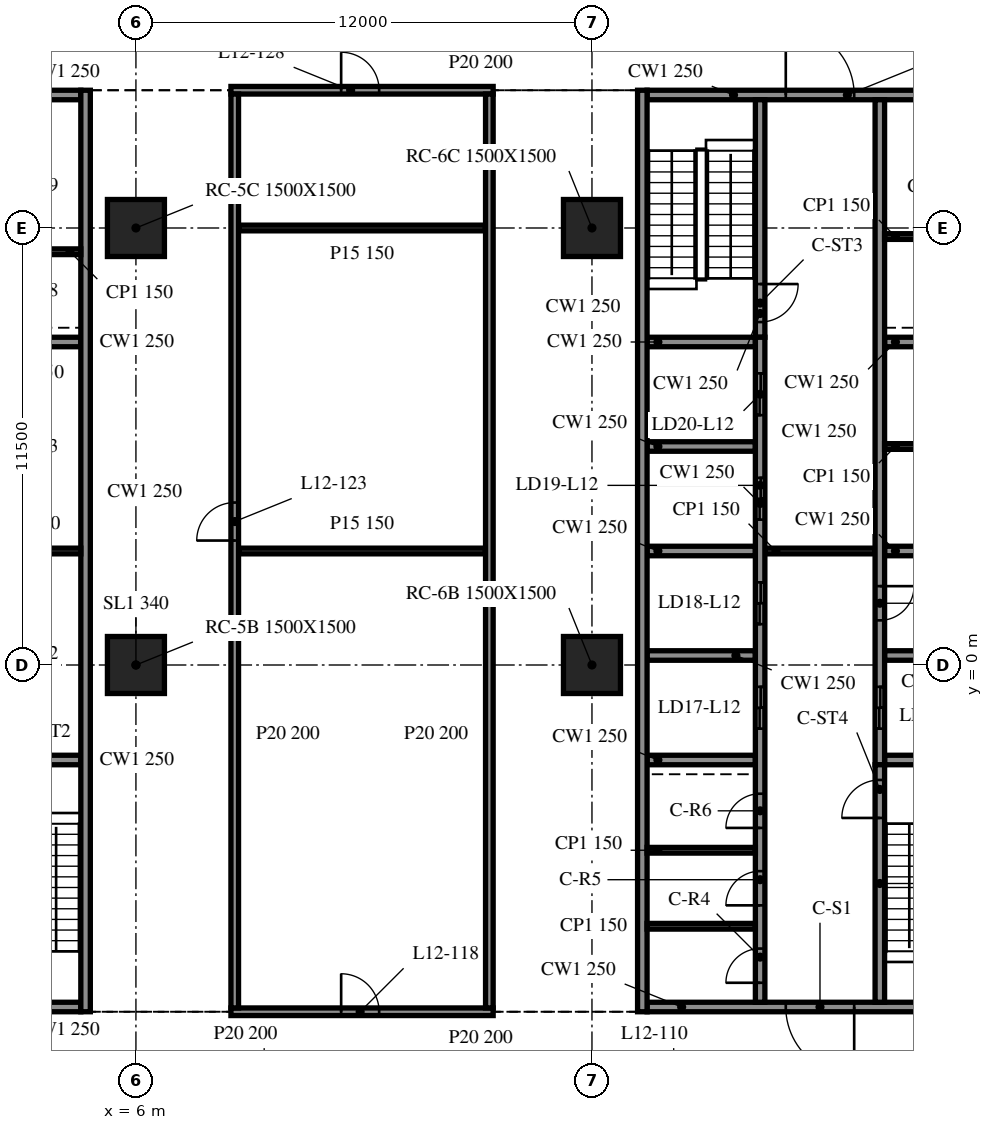
"""IFC4 building model, lengths in metres.
Left out: names, types, materials, properties, quantities, classifications, styles, units other than length and angle.
Written with IfcOpenShell. Run it as: python <this file> out.ifc"""

import sys

from ifc_helpers import new_model, si_unit, direction, frame, frame_2d, origin, origin_2d, place, context, subcontext, project, spatial, rectangle, extrude, element, fill, save


model = new_model("IFC4")
c1 = context("Model", 3, precision=1e-05, world=origin(), true_north=direction((0.0, 1.0)))
c2 = subcontext(c1, "Body", "Model", "MODEL_VIEW")
j1 = project(units=[si_unit("LENGTHUNIT", "METRE"), si_unit("PLANEANGLEUNIT", "RADIAN")], contexts=[c1])
p1 = place(None, origin())
s1 = spatial("IfcSite", under=j1, at=p1, CompositionType="ELEMENT")
p2 = place(p1, origin())
s2 = spatial("IfcBuilding", under=s1, at=p2, CompositionType="ELEMENT")
p3 = place(p2, frame((0.0, 0.0, 54.6)))
s3 = spatial("IfcBuildingStorey", under=s2, at=p3, CompositionType="ELEMENT", Elevation=54.6)
for number, where, z_axis, x_axis in (
    (1, (6.0, 0.0, -0.34), (0.0, 0.0, 1.0), (1.0, 0.0, 0.0)),
    (2, (6.0, 11.5, -0.34), (0.0, 0.0, 1.0), (1.0, 0.0, 0.0)),
    (3, (18.0, 0.0, -0.34), (0.0, 0.0, 1.0), (1.0, 0.0, 0.0)),
    (4, (18.0, 11.5, -0.34), (0.0, 0.0, 1.0), (1.0, 0.0, 0.0)),
):
    element("IfcColumn", number, at=place(p3, frame(where, z_axis=z_axis, x_axis=x_axis)), inside=s3, PredefinedType="COLUMN", context=c2, shape_type="SweptSolid", body=[
        extrude(rectangle(XDim=1.5, YDim=1.5, at=origin_2d()), origin(), (0.0, 0.0, 1.0), 4.3),
    ])
p4 = place(p3, frame((4.675, -9.125, 0.0), z_axis=(0.0, 0.0, 1.0), x_axis=(0.0, 1.0, 0.0)))
e5 = element("IfcWall", 5, at=p4, inside=s3, PredefinedType="SOLIDWALL", context=c2, shape_type="SweptSolid", body=[
    extrude(rectangle(XDim=24.25, YDim=0.25, at=frame_2d((12.125, 0.0))), origin(), (0.0, 0.0, 1.0), 3.96),
])
p5 = place(p3, frame((4.55, -9.0, 0.0), z_axis=(0.0, 0.0, 1.0), x_axis=(-1.0, 0.0, 0.0)))
e6 = element("IfcWall", 6, at=p5, inside=s3, PredefinedType="SOLIDWALL", context=c2, shape_type="SweptSolid", body=[
    extrude(rectangle(XDim=9.1, YDim=0.25, at=frame_2d((4.55, 0.0))), origin(), (0.0, 0.0, 1.0), 3.96),
])
p6 = place(p5, frame((3.65, 0.0, 0.0)))
e7 = element("IfcOpeningElement", 7, at=p6, cuts=e6, PredefinedType="OPENING", context=c2, shape_type="SweptSolid", body=[
    extrude(rectangle(XDim=1.8, YDim=2.1, at=frame_2d((0.9, 1.05))), frame((0.0, 0.135, 0.0), z_axis=(0.0, -1.0, 0.0), x_axis=(1.0, 0.0, 0.0)), (0.0, 0.0, 1.0), 0.27),
])
p7 = place(p3, frame((-4.55, 15.0, 0.0), z_axis=(0.0, 0.0, 1.0), x_axis=(1.0, 0.0, 0.0)))
e8 = element("IfcWall", 8, at=p7, inside=s3, PredefinedType="SOLIDWALL", context=c2, shape_type="SweptSolid", body=[
    extrude(rectangle(XDim=9.1, YDim=0.25, at=frame_2d((4.55, 0.0))), origin(), (0.0, 0.0, 1.0), 3.96),
])
p8 = place(p7, frame((3.65, 0.0, 0.0)))
e9 = element("IfcOpeningElement", 9, at=p8, cuts=e8, PredefinedType="OPENING", context=c2, shape_type="SweptSolid", body=[
    extrude(rectangle(XDim=1.8, YDim=2.1, at=frame_2d((0.9, 1.05))), frame((0.0, 0.135, 0.0), z_axis=(0.0, -1.0, 0.0), x_axis=(1.0, 0.0, 0.0)), (0.0, 0.0, 1.0), 0.27),
])
for number, where, z_axis, x_axis in (
    (10, (1.7, -2.5, 0.0), (0.0, 0.0, 1.0), (1.0, 0.0, 0.0)),
    (11, (1.7, 8.5, 0.0), (0.0, 0.0, 1.0), (1.0, 0.0, 0.0)),
):
    element("IfcWall", number, at=place(p3, frame(where, z_axis=z_axis, x_axis=x_axis)), inside=s3, PredefinedType="SOLIDWALL", context=c2, shape_type="SweptSolid", body=[
        extrude(rectangle(XDim=2.85, YDim=0.25, at=frame_2d((1.425, 0.0))), origin(), (0.0, 0.0, 1.0), 3.96),
    ])
for number, where, z_axis, x_axis in (
    (12, (1.7, 3.0, 0.0), (0.0, 0.0, 1.0), (1.0, 0.0, 0.0)),
    (13, (1.7, 10.875, 0.0), (0.0, 0.0, 1.0), (1.0, 0.0, 0.0)),
):
    element("IfcWall", number, at=place(p3, frame(where, z_axis=z_axis, x_axis=x_axis)), inside=s3, PredefinedType="PARTITIONING", context=c2, shape_type="SweptSolid", body=[
        extrude(rectangle(XDim=2.85, YDim=0.15, at=frame_2d((1.425, 0.0))), origin(), (0.0, 0.0, 1.0), 3.96),
    ])
p9 = place(p3, frame((19.325, 15.125, 0.0), z_axis=(0.0, 0.0, 1.0), x_axis=(0.0, -1.0, 0.0)))
e14 = element("IfcWall", 14, at=p9, inside=s3, PredefinedType="SOLIDWALL", context=c2, shape_type="SweptSolid", body=[
    extrude(rectangle(XDim=24.25, YDim=0.25, at=frame_2d((12.125, 0.0))), origin(), (0.0, 0.0, 1.0), 3.96),
])
p10 = place(p3, frame((28.55, -9.0, 0.0), z_axis=(0.0, 0.0, 1.0), x_axis=(-1.0, 0.0, 0.0)))
e15 = element("IfcWall", 15, at=p10, inside=s3, PredefinedType="SOLIDWALL", context=c2, shape_type="SweptSolid", body=[
    extrude(rectangle(XDim=9.1, YDim=0.25, at=frame_2d((4.55, 0.0))), origin(), (0.0, 0.0, 1.0), 3.96),
])
p11 = place(p10, frame((3.65, 0.0, 0.0)))
e16 = element("IfcOpeningElement", 16, at=p11, cuts=e15, PredefinedType="OPENING", context=c2, shape_type="SweptSolid", body=[
    extrude(rectangle(XDim=1.8, YDim=2.1, at=frame_2d((0.9, 1.05))), frame((0.0, 0.135, 0.0), z_axis=(0.0, -1.0, 0.0), x_axis=(1.0, 0.0, 0.0)), (0.0, 0.0, 1.0), 0.27),
])
p12 = place(p3, frame((19.45, 15.0, 0.0), z_axis=(0.0, 0.0, 1.0), x_axis=(1.0, 0.0, 0.0)))
e17 = element("IfcWall", 17, at=p12, inside=s3, PredefinedType="SOLIDWALL", context=c2, shape_type="SweptSolid", body=[
    extrude(rectangle(XDim=9.1, YDim=0.25, at=frame_2d((4.55, 0.0))), origin(), (0.0, 0.0, 1.0), 3.96),
])
p13 = place(p12, frame((3.65, 0.0, 0.0)))
e18 = element("IfcOpeningElement", 18, at=p13, cuts=e17, PredefinedType="OPENING", context=c2, shape_type="SweptSolid", body=[
    extrude(rectangle(XDim=1.8, YDim=2.1, at=frame_2d((0.9, 1.05))), frame((0.0, 0.135, 0.0), z_axis=(0.0, -1.0, 0.0), x_axis=(1.0, 0.0, 0.0)), (0.0, 0.0, 1.0), 0.27),
])
p14 = place(p3, frame((22.425, -8.875, 0.0), z_axis=(0.0, 0.0, 1.0), x_axis=(0.0, 1.0, 0.0)))
e19 = element("IfcWall", 19, at=p14, inside=s3, PredefinedType="SOLIDWALL", context=c2, shape_type="SweptSolid", body=[
    extrude(rectangle(XDim=17.5, YDim=0.25, at=frame_2d((8.75, 0.0))), origin(), (0.0, 0.0, 1.0), 3.96),
])
p15 = place(p14, frame((7.2, 0.0, 0.0)))
e20 = element("IfcOpeningElement", 20, at=p15, cuts=e19, PredefinedType="OPENING", context=c2, shape_type="SweptSolid", body=[
    extrude(rectangle(XDim=1.1, YDim=2.1, at=frame_2d((0.55, 1.05))), frame((0.0, 0.135, 0.0), z_axis=(0.0, -1.0, 0.0), x_axis=(1.0, 0.0, 0.0)), (0.0, 0.0, 1.0), 0.27),
])
p16 = place(p14, frame((9.95, 0.0, 0.0)))
e21 = element("IfcOpeningElement", 21, at=p16, cuts=e19, PredefinedType="OPENING", context=c2, shape_type="SweptSolid", body=[
    extrude(rectangle(XDim=1.1, YDim=2.1, at=frame_2d((0.55, 1.05))), frame((0.0, 0.135, 0.0), z_axis=(0.0, -1.0, 0.0), x_axis=(1.0, 0.0, 0.0)), (0.0, 0.0, 1.0), 0.27),
])
p17 = place(p14, frame((12.7, 0.0, 0.0)))
e22 = element("IfcOpeningElement", 22, at=p17, cuts=e19, PredefinedType="OPENING", context=c2, shape_type="SweptSolid", body=[
    extrude(rectangle(XDim=1.1, YDim=2.1, at=frame_2d((0.55, 1.05))), frame((0.0, 0.135, 0.0), z_axis=(0.0, -1.0, 0.0), x_axis=(1.0, 0.0, 0.0)), (0.0, 0.0, 1.0), 0.27),
])
p18 = place(p14, frame((15.45, 0.0, 0.0)))
e23 = element("IfcOpeningElement", 23, at=p18, cuts=e19, PredefinedType="OPENING", context=c2, shape_type="SweptSolid", body=[
    extrude(rectangle(XDim=1.1, YDim=2.1, at=frame_2d((0.55, 1.05))), frame((0.0, 0.135, 0.0), z_axis=(0.0, -1.0, 0.0), x_axis=(1.0, 0.0, 0.0)), (0.0, 0.0, 1.0), 0.27),
])
p19 = place(p14, frame((0.512, 0.0, 0.0)))
e24 = element("IfcOpeningElement", 24, at=p19, cuts=e19, PredefinedType="OPENING", context=c2, shape_type="SweptSolid", body=[
    extrude(rectangle(XDim=0.9, YDim=2.1, at=frame_2d((0.45, 1.05))), frame((0.0, 0.135, 0.0), z_axis=(0.0, -1.0, 0.0), x_axis=(1.0, 0.0, 0.0)), (0.0, 0.0, 1.0), 0.27),
])
p20 = place(p14, frame((2.55, 0.0, 0.0)))
e25 = element("IfcOpeningElement", 25, at=p20, cuts=e19, PredefinedType="OPENING", context=c2, shape_type="SweptSolid", body=[
    extrude(rectangle(XDim=0.9, YDim=2.1, at=frame_2d((0.45, 1.05))), frame((0.0, 0.135, 0.0), z_axis=(0.0, -1.0, 0.0), x_axis=(1.0, 0.0, 0.0)), (0.0, 0.0, 1.0), 0.27),
])
p21 = place(p14, frame((4.587, 0.0, 0.0)))
e26 = element("IfcOpeningElement", 26, at=p21, cuts=e19, PredefinedType="OPENING", context=c2, shape_type="SweptSolid", body=[
    extrude(rectangle(XDim=0.9, YDim=2.1, at=frame_2d((0.45, 1.05))), frame((0.0, 0.135, 0.0), z_axis=(0.0, -1.0, 0.0), x_axis=(1.0, 0.0, 0.0)), (0.0, 0.0, 1.0), 0.27),
])
p22 = place(p3, frame((22.425, 14.875, 0.0), z_axis=(0.0, 0.0, 1.0), x_axis=(0.0, -1.0, 0.0)))
e27 = element("IfcWall", 27, at=p22, inside=s3, PredefinedType="SOLIDWALL", context=c2, shape_type="SweptSolid", body=[
    extrude(rectangle(XDim=6.25, YDim=0.25, at=frame_2d((3.125, 0.0))), origin(), (0.0, 0.0, 1.0), 3.96),
])
p23 = place(p22, frame((4.85, 0.0, 0.0)))
e28 = element("IfcOpeningElement", 28, at=p23, cuts=e27, PredefinedType="OPENING", context=c2, shape_type="SweptSolid", body=[
    extrude(rectangle(XDim=1.0, YDim=2.1, at=frame_2d((0.5, 1.05))), frame((0.0, 0.135, 0.0), z_axis=(0.0, -1.0, 0.0), x_axis=(1.0, 0.0, 0.0)), (0.0, 0.0, 1.0), 0.27),
])
p24 = place(p3, frame((25.575, -8.875, 0.0), z_axis=(0.0, 0.0, 1.0), x_axis=(0.0, 1.0, 0.0)))
e29 = element("IfcWall", 29, at=p24, inside=s3, PredefinedType="SOLIDWALL", context=c2, shape_type="SweptSolid", body=[
    extrude(rectangle(XDim=6.25, YDim=0.25, at=frame_2d((3.125, 0.0))), origin(), (0.0, 0.0, 1.0), 3.96),
])
p25 = place(p24, frame((4.85, 0.0, 0.0)))
e30 = element("IfcOpeningElement", 30, at=p25, cuts=e29, PredefinedType="OPENING", context=c2, shape_type="SweptSolid", body=[
    extrude(rectangle(XDim=1.0, YDim=2.1, at=frame_2d((0.5, 1.05))), frame((0.0, 0.135, 0.0), z_axis=(0.0, -1.0, 0.0), x_axis=(1.0, 0.0, 0.0)), (0.0, 0.0, 1.0), 0.27),
])
p26 = place(p3, frame((25.575, 14.875, 0.0), z_axis=(0.0, 0.0, 1.0), x_axis=(0.0, -1.0, 0.0)))
e31 = element("IfcWall", 31, at=p26, inside=s3, PredefinedType="SOLIDWALL", context=c2, shape_type="SweptSolid", body=[
    extrude(rectangle(XDim=17.5, YDim=0.25, at=frame_2d((8.75, 0.0))), origin(), (0.0, 0.0, 1.0), 3.96),
])
p27 = place(p26, frame((15.45, 0.0, 0.0)))
e32 = element("IfcOpeningElement", 32, at=p27, cuts=e31, PredefinedType="OPENING", context=c2, shape_type="SweptSolid", body=[
    extrude(rectangle(XDim=1.1, YDim=2.1, at=frame_2d((0.55, 1.05))), frame((0.0, 0.135, 0.0), z_axis=(0.0, -1.0, 0.0), x_axis=(1.0, 0.0, 0.0)), (0.0, 0.0, 1.0), 0.27),
])
p28 = place(p26, frame((12.8, 0.0, 0.0)))
e33 = element("IfcOpeningElement", 33, at=p28, cuts=e31, PredefinedType="OPENING", context=c2, shape_type="SweptSolid", body=[
    extrude(rectangle(XDim=0.9, YDim=2.1, at=frame_2d((0.45, 1.05))), frame((0.0, 0.135, 0.0), z_axis=(0.0, -1.0, 0.0), x_axis=(1.0, 0.0, 0.0)), (0.0, 0.0, 1.0), 0.27),
])
for number, where, z_axis, x_axis in (
    (34, (19.45, -2.5, 0.0), (0.0, 0.0, 1.0), (1.0, 0.0, 0.0)),
    (35, (19.45, 0.25, 0.0), (0.0, 0.0, 1.0), (1.0, 0.0, 0.0)),
    (36, (19.45, 3.0, 0.0), (0.0, 0.0, 1.0), (1.0, 0.0, 0.0)),
    (37, (19.45, 5.75, 0.0), (0.0, 0.0, 1.0), (1.0, 0.0, 0.0)),
    (38, (19.45, 8.5, 0.0), (0.0, 0.0, 1.0), (1.0, 0.0, 0.0)),
    (39, (25.7, -2.5, 0.0), (0.0, 0.0, 1.0), (1.0, 0.0, 0.0)),
    (40, (25.7, 0.25, 0.0), (0.0, 0.0, 1.0), (1.0, 0.0, 0.0)),
    (41, (25.7, 3.0, 0.0), (0.0, 0.0, 1.0), (1.0, 0.0, 0.0)),
    (42, (25.7, 8.5, 0.0), (0.0, 0.0, 1.0), (1.0, 0.0, 0.0)),
):
    element("IfcWall", number, at=place(p3, frame(where, z_axis=z_axis, x_axis=x_axis)), inside=s3, PredefinedType="SOLIDWALL", context=c2, shape_type="SweptSolid", body=[
        extrude(rectangle(XDim=2.85, YDim=0.25, at=frame_2d((1.425, 0.0))), origin(), (0.0, 0.0, 1.0), 3.96),
    ])
p29 = place(p3, frame((22.55, 3.0, 0.0), z_axis=(0.0, 0.0, 1.0), x_axis=(1.0, 0.0, 0.0)))
e43 = element("IfcWall", 43, at=p29, inside=s3, PredefinedType="PARTITIONING", context=c2, shape_type="SweptSolid", body=[
    extrude(rectangle(XDim=2.9, YDim=0.15, at=frame_2d((1.45, 0.0))), origin(), (0.0, 0.0, 1.0), 3.96),
])
for number, where, z_axis, x_axis in (
    (44, (25.7, 5.75, 0.0), (0.0, 0.0, 1.0), (1.0, 0.0, 0.0)),
    (45, (19.45, -6.875, 0.0), (0.0, 0.0, 1.0), (1.0, 0.0, 0.0)),
    (46, (19.45, -4.875, 0.0), (0.0, 0.0, 1.0), (1.0, 0.0, 0.0)),
    (47, (25.7, 11.275, 0.0), (0.0, 0.0, 1.0), (1.0, 0.0, 0.0)),
):
    element("IfcWall", number, at=place(p3, frame(where, z_axis=z_axis, x_axis=x_axis)), inside=s3, PredefinedType="PARTITIONING", context=c2, shape_type="SweptSolid", body=[
        extrude(rectangle(XDim=2.85, YDim=0.15, at=frame_2d((1.425, 0.0))), origin(), (0.0, 0.0, 1.0), 3.96),
    ])
p30 = place(p3, frame((8.5, -9.125, 0.0), z_axis=(0.0, 0.0, 1.0), x_axis=(1.0, 0.0, 0.0)))
e48 = element("IfcWall", 48, at=p30, inside=s3, PredefinedType="PARTITIONING", context=c2, shape_type="SweptSolid", body=[
    extrude(rectangle(XDim=6.9, YDim=0.2, at=frame_2d((3.45, 0.0))), origin(), (0.0, 0.0, 1.0), 3.96),
])
p31 = place(p30, frame((2.9, 0.0, 0.0)))
e49 = element("IfcOpeningElement", 49, at=p31, cuts=e48, PredefinedType="OPENING", context=c2, shape_type="SweptSolid", body=[
    extrude(rectangle(XDim=1.0, YDim=2.1, at=frame_2d((0.5, 1.05))), frame((0.0, 0.11, 0.0), z_axis=(0.0, -1.0, 0.0), x_axis=(1.0, 0.0, 0.0)), (0.0, 0.0, 1.0), 0.22),
])
for number, where, z_axis, x_axis in (
    (50, (8.7, 3.0, 0.0), (0.0, 0.0, 1.0), (1.0, 0.0, 0.0)),
    (51, (8.7, 11.5, 0.0), (0.0, 0.0, 1.0), (1.0, 0.0, 0.0)),
):
    element("IfcWall", number, at=place(p3, frame(where, z_axis=z_axis, x_axis=x_axis)), inside=s3, PredefinedType="PARTITIONING", context=c2, shape_type="SweptSolid", body=[
        extrude(rectangle(XDim=6.5, YDim=0.15, at=frame_2d((3.25, 0.0))), origin(), (0.0, 0.0, 1.0), 3.96),
    ])
p32 = place(p3, frame((8.5, 15.125, 0.0), z_axis=(0.0, 0.0, 1.0), x_axis=(1.0, 0.0, 0.0)))
e52 = element("IfcWall", 52, at=p32, inside=s3, PredefinedType="PARTITIONING", context=c2, shape_type="SweptSolid", body=[
    extrude(rectangle(XDim=6.9, YDim=0.2, at=frame_2d((3.45, 0.0))), origin(), (0.0, 0.0, 1.0), 3.96),
])
p33 = place(p32, frame((2.9, 0.0, 0.0)))
e53 = element("IfcOpeningElement", 53, at=p33, cuts=e52, PredefinedType="OPENING", context=c2, shape_type="SweptSolid", body=[
    extrude(rectangle(XDim=1.0, YDim=2.1, at=frame_2d((0.5, 1.05))), frame((0.0, 0.11, 0.0), z_axis=(0.0, -1.0, 0.0), x_axis=(1.0, 0.0, 0.0)), (0.0, 0.0, 1.0), 0.22),
])
p34 = place(p3, frame((8.6, -9.025, 0.0), z_axis=(0.0, 0.0, 1.0), x_axis=(0.0, 1.0, 0.0)))
e54 = element("IfcWall", 54, at=p34, inside=s3, PredefinedType="PARTITIONING", context=c2, shape_type="SweptSolid", body=[
    extrude(rectangle(XDim=24.05, YDim=0.2, at=frame_2d((12.025, 0.0))), origin(), (0.0, 0.0, 1.0), 3.96),
])
p35 = place(p34, frame((12.3, 0.0, 0.0)))
e55 = element("IfcOpeningElement", 55, at=p35, cuts=e54, PredefinedType="OPENING", context=c2, shape_type="SweptSolid", body=[
    extrude(rectangle(XDim=1.0, YDim=2.1, at=frame_2d((0.5, 1.05))), frame((0.0, 0.11, 0.0), z_axis=(0.0, -1.0, 0.0), x_axis=(1.0, 0.0, 0.0)), (0.0, 0.0, 1.0), 0.22),
])
p36 = place(p3, frame((15.3, -9.025, 0.0), z_axis=(0.0, 0.0, 1.0), x_axis=(0.0, 1.0, 0.0)))
e56 = element("IfcWall", 56, at=p36, inside=s3, PredefinedType="PARTITIONING", context=c2, shape_type="SweptSolid", body=[
    extrude(rectangle(XDim=24.05, YDim=0.2, at=frame_2d((12.025, 0.0))), origin(), (0.0, 0.0, 1.0), 3.96),
])
p37 = place(p11, origin())
e57 = element("IfcDoor", 57, at=p37, inside=s3, OperationType="DOUBLE_DOOR_SINGLE_SWING", PredefinedType="DOOR", context=c2, shape_type="SweptSolid", body=[
    extrude(rectangle(XDim=1.8, YDim=2.1, at=frame_2d((0.9, 1.05))), frame((0.0, 0.025, 0.0), z_axis=(0.0, -1.0, 0.0), x_axis=(1.0, 0.0, 0.0)), (0.0, 0.0, 1.0), 0.05),
])
fill(e16, e57)
p38 = place(p13, origin())
e58 = element("IfcDoor", 58, at=p38, inside=s3, OperationType="DOUBLE_DOOR_SINGLE_SWING", PredefinedType="DOOR", context=c2, shape_type="SweptSolid", body=[
    extrude(rectangle(XDim=1.8, YDim=2.1, at=frame_2d((0.9, 1.05))), frame((0.0, 0.025, 0.0), z_axis=(0.0, -1.0, 0.0), x_axis=(1.0, 0.0, 0.0)), (0.0, 0.0, 1.0), 0.05),
])
fill(e18, e58)
p39 = place(p27, origin())
e59 = element("IfcDoor", 59, at=p39, inside=s3, OperationType="DOUBLE_DOOR_SLIDING", PredefinedType="DOOR", context=c2, shape_type="SweptSolid", body=[
    extrude(rectangle(XDim=1.1, YDim=2.1, at=frame_2d((0.55, 1.05))), frame((0.0, 0.025, 0.0), z_axis=(0.0, -1.0, 0.0), x_axis=(1.0, 0.0, 0.0)), (0.0, 0.0, 1.0), 0.05),
])
fill(e32, e59)
p40 = place(p15, origin())
e60 = element("IfcDoor", 60, at=p40, inside=s3, OperationType="DOUBLE_DOOR_SLIDING", PredefinedType="DOOR", context=c2, shape_type="SweptSolid", body=[
    extrude(rectangle(XDim=1.1, YDim=2.1, at=frame_2d((0.55, 1.05))), frame((0.0, 0.025, 0.0), z_axis=(0.0, -1.0, 0.0), x_axis=(1.0, 0.0, 0.0)), (0.0, 0.0, 1.0), 0.05),
])
fill(e20, e60)
p41 = place(p16, origin())
e61 = element("IfcDoor", 61, at=p41, inside=s3, OperationType="DOUBLE_DOOR_SLIDING", PredefinedType="DOOR", context=c2, shape_type="SweptSolid", body=[
    extrude(rectangle(XDim=1.1, YDim=2.1, at=frame_2d((0.55, 1.05))), frame((0.0, 0.025, 0.0), z_axis=(0.0, -1.0, 0.0), x_axis=(1.0, 0.0, 0.0)), (0.0, 0.0, 1.0), 0.05),
])
fill(e21, e61)
p42 = place(p17, origin())
e62 = element("IfcDoor", 62, at=p42, inside=s3, OperationType="DOUBLE_DOOR_SLIDING", PredefinedType="DOOR", context=c2, shape_type="SweptSolid", body=[
    extrude(rectangle(XDim=1.1, YDim=2.1, at=frame_2d((0.55, 1.05))), frame((0.0, 0.025, 0.0), z_axis=(0.0, -1.0, 0.0), x_axis=(1.0, 0.0, 0.0)), (0.0, 0.0, 1.0), 0.05),
])
fill(e22, e62)
p43 = place(p18, origin())
e63 = element("IfcDoor", 63, at=p43, inside=s3, OperationType="DOUBLE_DOOR_SLIDING", PredefinedType="DOOR", context=c2, shape_type="SweptSolid", body=[
    extrude(rectangle(XDim=1.1, YDim=2.1, at=frame_2d((0.55, 1.05))), frame((0.0, 0.025, 0.0), z_axis=(0.0, -1.0, 0.0), x_axis=(1.0, 0.0, 0.0)), (0.0, 0.0, 1.0), 0.05),
])
fill(e23, e63)
p44 = place(p28, origin())
e64 = element("IfcDoor", 64, at=p44, inside=s3, OperationType="SINGLE_SWING_LEFT", PredefinedType="DOOR", context=c2, shape_type="SweptSolid", body=[
    extrude(rectangle(XDim=0.9, YDim=2.1, at=frame_2d((0.45, 1.05))), frame((0.0, 0.025, 0.0), z_axis=(0.0, -1.0, 0.0), x_axis=(1.0, 0.0, 0.0)), (0.0, 0.0, 1.0), 0.05),
])
fill(e33, e64)
p45 = place(p19, origin())
e65 = element("IfcDoor", 65, at=p45, inside=s3, OperationType="SINGLE_SWING_RIGHT", PredefinedType="DOOR", context=c2, shape_type="SweptSolid", body=[
    extrude(rectangle(XDim=0.9, YDim=2.1, at=frame_2d((0.45, 1.05))), frame((0.0, 0.025, 0.0), z_axis=(0.0, -1.0, 0.0), x_axis=(1.0, 0.0, 0.0)), (0.0, 0.0, 1.0), 0.05),
])
fill(e24, e65)
p46 = place(p20, origin())
e66 = element("IfcDoor", 66, at=p46, inside=s3, OperationType="SINGLE_SWING_LEFT", PredefinedType="DOOR", context=c2, shape_type="SweptSolid", body=[
    extrude(rectangle(XDim=0.9, YDim=2.1, at=frame_2d((0.45, 1.05))), frame((0.0, 0.025, 0.0), z_axis=(0.0, -1.0, 0.0), x_axis=(1.0, 0.0, 0.0)), (0.0, 0.0, 1.0), 0.05),
])
fill(e25, e66)
p47 = place(p21, origin())
e67 = element("IfcDoor", 67, at=p47, inside=s3, OperationType="SINGLE_SWING_RIGHT", PredefinedType="DOOR", context=c2, shape_type="SweptSolid", body=[
    extrude(rectangle(XDim=0.9, YDim=2.1, at=frame_2d((0.45, 1.05))), frame((0.0, 0.025, 0.0), z_axis=(0.0, -1.0, 0.0), x_axis=(1.0, 0.0, 0.0)), (0.0, 0.0, 1.0), 0.05),
])
fill(e26, e67)
p48 = place(p23, origin())
e68 = element("IfcDoor", 68, at=p48, inside=s3, OperationType="SINGLE_SWING_LEFT", PredefinedType="DOOR", context=c2, shape_type="SweptSolid", body=[
    extrude(rectangle(XDim=1.0, YDim=2.1, at=frame_2d((0.5, 1.05))), frame((0.0, 0.025, 0.0), z_axis=(0.0, -1.0, 0.0), x_axis=(1.0, 0.0, 0.0)), (0.0, 0.0, 1.0), 0.05),
])
fill(e28, e68)
p49 = place(p25, origin())
e69 = element("IfcDoor", 69, at=p49, inside=s3, OperationType="SINGLE_SWING_RIGHT", PredefinedType="DOOR", context=c2, shape_type="SweptSolid", body=[
    extrude(rectangle(XDim=1.0, YDim=2.1, at=frame_2d((0.5, 1.05))), frame((0.0, 0.025, 0.0), z_axis=(0.0, -1.0, 0.0), x_axis=(1.0, 0.0, 0.0)), (0.0, 0.0, 1.0), 0.05),
])
fill(e30, e69)
p50 = place(p31, origin())
e70 = element("IfcDoor", 70, at=p50, inside=s3, OperationType="SINGLE_SWING_LEFT", PredefinedType="DOOR", context=c2, shape_type="SweptSolid", body=[
    extrude(rectangle(XDim=1.0, YDim=2.1, at=frame_2d((0.5, 1.05))), frame((0.0, 0.025, 0.0), z_axis=(0.0, -1.0, 0.0), x_axis=(1.0, 0.0, 0.0)), (0.0, 0.0, 1.0), 0.05),
])
fill(e49, e70)
p51 = place(p35, origin())
e71 = element("IfcDoor", 71, at=p51, inside=s3, OperationType="SINGLE_SWING_LEFT", PredefinedType="DOOR", context=c2, shape_type="SweptSolid", body=[
    extrude(rectangle(XDim=1.0, YDim=2.1, at=frame_2d((0.5, 1.05))), frame((0.0, 0.025, 0.0), z_axis=(0.0, -1.0, 0.0), x_axis=(1.0, 0.0, 0.0)), (0.0, 0.0, 1.0), 0.05),
])
fill(e55, e71)
p52 = place(p33, origin())
e72 = element("IfcDoor", 72, at=p52, inside=s3, OperationType="SINGLE_SWING_RIGHT", PredefinedType="DOOR", context=c2, shape_type="SweptSolid", body=[
    extrude(rectangle(XDim=1.0, YDim=2.1, at=frame_2d((0.5, 1.05))), frame((0.0, 0.025, 0.0), z_axis=(0.0, -1.0, 0.0), x_axis=(1.0, 0.0, 0.0)), (0.0, 0.0, 1.0), 0.05),
])
fill(e53, e72)
save(model, sys.argv[1])
